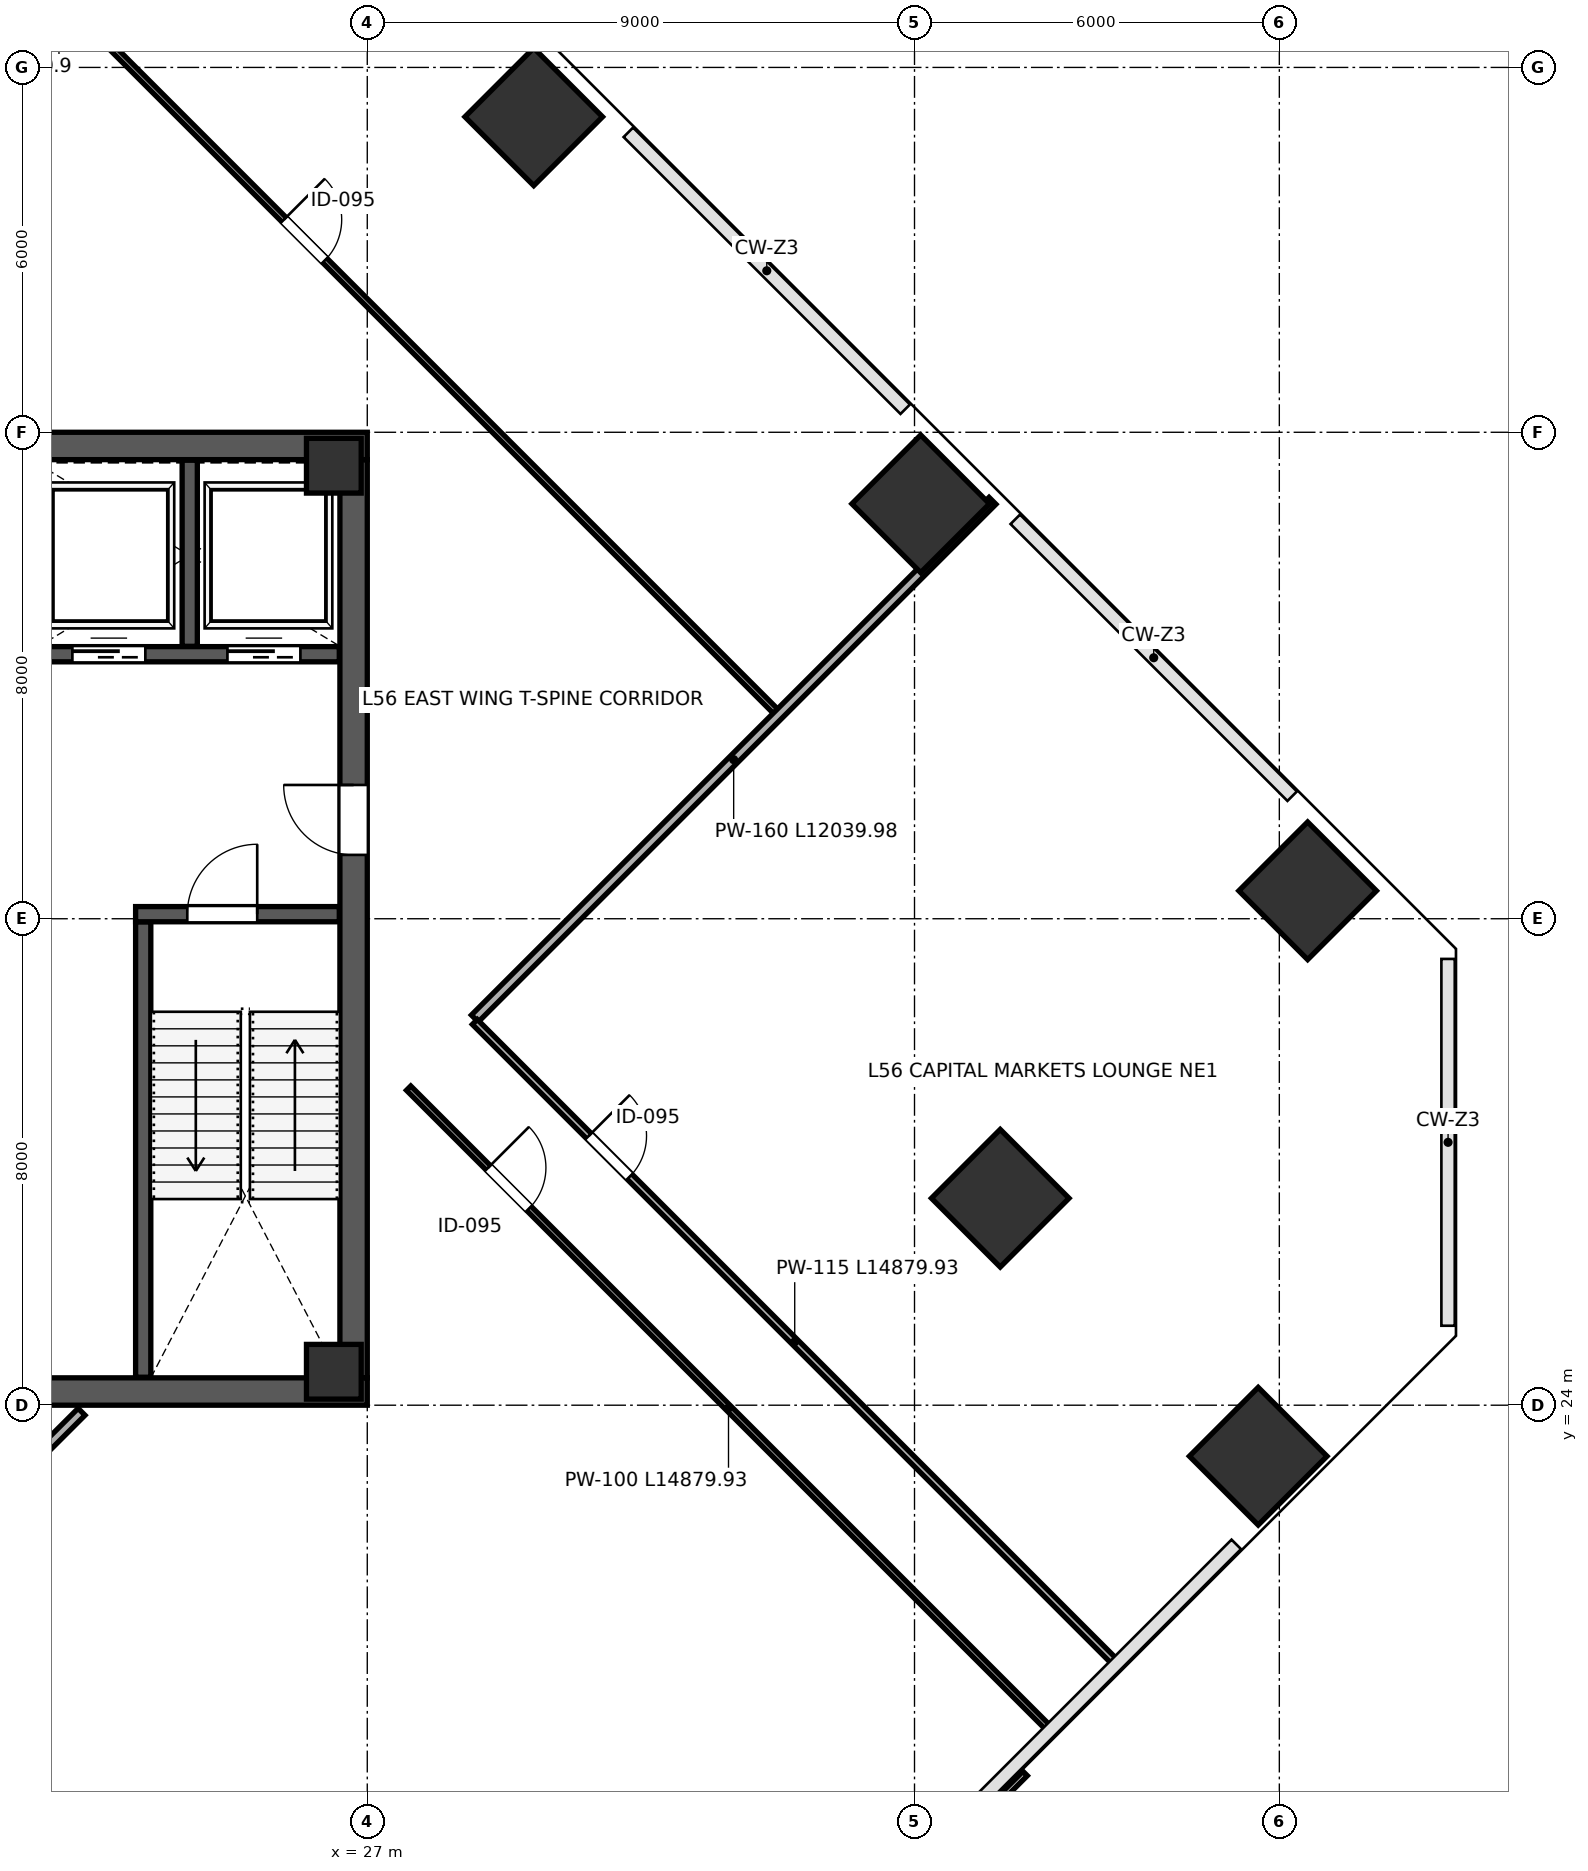
"""IFC4 building model, lengths in metres.
Left out: names, types, materials, properties, quantities, classifications, styles, units other than length and angle.
Written with IfcOpenShell. Run it as: python <this file> out.ifc"""

import sys

from ifc_helpers import new_model, si_unit, direction, frame, frame_2d, origin, origin_2d, place, context, subcontext, project, spatial, rectangle, extrude, source, transform, mapped, element, fill, save


model = new_model("IFC4")
c1 = context("Model", 3, precision=1e-05, world=origin(), true_north=direction((0.0, 1.0)))
c2 = subcontext(c1, "Body", "Model", "MODEL_VIEW")
j1 = project(units=[si_unit("LENGTHUNIT", "METRE"), si_unit("PLANEANGLEUNIT", "RADIAN")], contexts=[c1])
p1 = place(None, origin())
s1 = spatial("IfcSite", under=j1, at=p1, CompositionType="ELEMENT")
p2 = place(p1, origin())
s2 = spatial("IfcBuilding", under=s1, at=p2, CompositionType="ELEMENT")
p3 = place(p2, frame((0.0, 0.0, 250.0)))
s3 = spatial("IfcBuildingStorey", under=s2, at=p3, CompositionType="ELEMENT", Elevation=250.0)
m1 = source(origin(), c2, "Body", "SweptSolid", [
    extrude(rectangle(XDim=0.9, YDim=0.9, at=origin_2d()), origin(), (0.0, 0.0, 1.0), 4.198),
])
for number, where, z_axis, x_axis in (
    (1, (26.45, 24.55, 0.001), (0.0, 0.0, 1.0), (1.0, 0.0, 0.0)),
    (2, (26.45, 39.45, 0.001), (0.0, 0.0, 1.0), (1.0, 0.0, 0.0)),
):
    element("IfcColumn", number, at=place(p3, frame(where, z_axis=z_axis, x_axis=x_axis)), inside=s3, PredefinedType="COLUMN", context=c2, shape_type="MappedRepresentation", body=[
        mapped(m1, transform((0.0, 0.0, 0.0), scale=1.0)),
    ])
m2 = source(origin(), c2, "Body", "SweptSolid", [
    extrude(rectangle(XDim=1.6, YDim=1.6, at=origin_2d()), origin(), (0.0, 0.0, 1.0), 4.198),
])
for number, where, z_axis, x_axis in (
    (3, (29.738, 45.188, 0.001), (0.0, 0.0, 1.0), (-0.707, 0.707, 0.0)),
    (4, (36.102, 38.823, 0.001), (0.0, 0.0, 1.0), (-0.707, 0.707, 0.0)),
):
    element("IfcColumn", number, at=place(p3, frame(where, z_axis=z_axis, x_axis=x_axis)), inside=s3, PredefinedType="COLUMN", context=c2, shape_type="MappedRepresentation", body=[
        mapped(m2, transform((0.0, 0.0, 0.0), scale=1.0)),
    ])
m3 = source(origin(), c2, "Body", "SweptSolid", [
    extrude(rectangle(XDim=1.6, YDim=1.6, at=origin_2d()), origin(), (0.0, 0.0, 1.0), 4.198),
])
p4 = place(p3, frame((37.41, 27.404, 0.001), z_axis=(0.0, 0.0, 1.0), x_axis=(-0.707106781187, 0.707106781187, 0.0)))
e5 = element("IfcColumn", 5, at=p4, inside=s3, PredefinedType="COLUMN", context=c2, shape_type="MappedRepresentation", body=[
    mapped(m3, transform((0.0, 0.0, 0.0), scale=1.0)),
])
for number, where, z_axis, x_axis in (
    (6, (42.466, 32.46, 0.001), (0.0, 0.0, 1.0), (-0.707, 0.707, 0.0)),
    (7, (41.653, 23.161, 0.001), (0.0, 0.0, 1.0), (-0.707, 0.707, 0.0)),
):
    element("IfcColumn", number, at=place(p3, frame(where, z_axis=z_axis, x_axis=x_axis)), inside=s3, PredefinedType="COLUMN", context=c2, shape_type="MappedRepresentation", body=[
        mapped(m2, transform((0.0, 0.0, 0.0), scale=1.0)),
    ])
p5 = place(p3, frame((26.775, 24.45, 0.0), z_axis=(0.0, 0.0, 1.0), x_axis=(0.0, 1.0, 0.0)))
e8 = element("IfcWall", 8, at=p5, inside=s3, PredefinedType="SHEAR", context=c2, shape_type="SweptSolid", body=[
    extrude(rectangle(XDim=15.1, YDim=0.45, at=frame_2d((7.55, 0.0))), origin(), (0.0, 0.0, 1.0), 3.96),
])
p6 = place(p5, frame((8.6, 0.0, 0.0)))
e9 = element("IfcOpeningElement", 9, at=p6, cuts=e8, PredefinedType="OPENING", context=c2, shape_type="SweptSolid", body=[
    extrude(rectangle(XDim=1.15, YDim=2.2, at=frame_2d((0.575, 1.1))), frame((0.0, 0.235, 0.0), z_axis=(0.0, -1.0, 0.0), x_axis=(1.0, 0.0, 0.0)), (0.0, 0.0, 1.0), 0.47),
])
for number, where, z_axis, x_axis in (
    (10, (9.0, 24.225, 0.0), (0.0, 0.0, 1.0), (1.0, 0.0, 0.0)),
    (11, (9.0, 39.775, 0.0), (0.0, 0.0, 1.0), (1.0, 0.0, 0.0)),
):
    element("IfcWall", number, at=place(p3, frame(where, z_axis=z_axis, x_axis=x_axis)), inside=s3, PredefinedType="SHEAR", context=c2, shape_type="SweptSolid", body=[
        extrude(rectangle(XDim=18.0, YDim=0.45, at=frame_2d((9.0, 0.0))), origin(), (0.0, 0.0, 1.0), 3.96),
    ])
p7 = place(p3, frame((23.315, 24.46, 0.0), z_axis=(0.0, 0.0, 1.0), x_axis=(0.0, 1.0, 0.0)))
e12 = element("IfcWall", 12, at=p7, inside=s3, PredefinedType="SHEAR", context=c2, shape_type="SweptSolid", body=[
    extrude(rectangle(XDim=7.49, YDim=0.25, at=frame_2d((3.745, 0.0))), origin(), (0.0, 0.0, 1.0), 3.96),
])
p8 = place(p3, frame((23.19, 32.075, 0.0), z_axis=(0.0, 0.0, 1.0), x_axis=(1.0, 0.0, 0.0)))
e13 = element("IfcWall", 13, at=p8, inside=s3, PredefinedType="SHEAR", context=c2, shape_type="SweptSolid", body=[
    extrude(rectangle(XDim=3.35, YDim=0.25, at=frame_2d((1.675, 0.0))), origin(), (0.0, 0.0, 1.0), 3.96),
])
p9 = place(p8, frame((0.85, 0.0, 0.0)))
e14 = element("IfcOpeningElement", 14, at=p9, cuts=e13, PredefinedType="OPENING", context=c2, shape_type="SweptSolid", body=[
    extrude(rectangle(XDim=1.15, YDim=2.2, at=frame_2d((0.575, 1.1))), frame((0.0, 0.135, 0.0), z_axis=(0.0, -1.0, 0.0), x_axis=(1.0, 0.0, 0.0)), (0.0, 0.0, 1.0), 0.27),
])
p10 = place(p3, frame((21.45, 36.35, 0.0), z_axis=(0.0, 0.0, 1.0), x_axis=(1.0, 0.0, 0.0)))
e15 = element("IfcWall", 15, at=p10, inside=s3, PredefinedType="SHEAR", context=c2, shape_type="SweptSolid", body=[
    extrude(rectangle(XDim=5.09, YDim=0.25, at=frame_2d((2.545, 0.0))), origin(), (0.0, 0.0, 1.0), 3.96),
])
p11 = place(p10, frame((0.7, 0.0, 0.0)))
e16 = element("IfcOpeningElement", 16, at=p11, cuts=e15, PredefinedType="OPENING", context=c2, shape_type="SweptSolid", body=[
    extrude(rectangle(XDim=1.2, YDim=2.2, at=frame_2d((0.6, 1.1))), frame((0.0, 0.135, 0.0), z_axis=(0.0, -1.0, 0.0), x_axis=(1.0, 0.0, 0.0)), (0.0, 0.0, 1.0), 0.27),
])
p12 = place(p10, frame((3.25, 0.0, 0.0)))
e17 = element("IfcOpeningElement", 17, at=p12, cuts=e15, PredefinedType="OPENING", context=c2, shape_type="SweptSolid", body=[
    extrude(rectangle(XDim=1.2, YDim=2.2, at=frame_2d((0.6, 1.1))), frame((0.0, 0.135, 0.0), z_axis=(0.0, -1.0, 0.0), x_axis=(1.0, 0.0, 0.0)), (0.0, 0.0, 1.0), 0.27),
])
p13 = place(p3, frame((24.08, 36.48, 0.0), z_axis=(0.0, 0.0, 1.0), x_axis=(0.0, 1.0, 0.0)))
e18 = element("IfcWall", 18, at=p13, inside=s3, PredefinedType="SHEAR", context=c2, shape_type="SweptSolid", body=[
    extrude(rectangle(XDim=3.06, YDim=0.25, at=frame_2d((1.53, 0.0))), origin(), (0.0, 0.0, 1.0), 3.96),
])
p14 = place(p3, frame((17.993, 51.134, 0.0), z_axis=(0.0, 0.0, 1.0), x_axis=(0.707106781187, -0.707106781187, 0.0)))
e19 = element("IfcWall", 19, at=p14, inside=s3, PredefinedType="PARTITIONING", context=c2, shape_type="SweptSolid", body=[
    extrude(rectangle(XDim=22.27, YDim=0.1, at=frame_2d((11.135, 0.0))), origin(), (0.0, 0.0, 1.0), 3.96),
])
p15 = place(p14, frame((10.8, 0.0, 0.0)))
e20 = element("IfcOpeningElement", 20, at=p15, cuts=e19, PredefinedType="OPENING", context=c2, shape_type="SweptSolid", body=[
    extrude(rectangle(XDim=0.95, YDim=2.15, at=frame_2d((0.475, 1.075))), frame((0.0, 0.06, 0.0), z_axis=(0.0, -1.0, 0.0), x_axis=(1.0, 0.0, 0.0)), (0.0, 0.0, 1.0), 0.12),
])
p16 = place(p3, frame((28.769, 30.36, 0.0), z_axis=(0.0, 0.0, 1.0), x_axis=(0.707116919863, 0.707096642365, 0.0)))
e21 = element("IfcWall", 21, at=p16, inside=s3, PredefinedType="PARTITIONING", context=c2, shape_type="SweptSolid", body=[
    extrude(rectangle(XDim=12.04, YDim=0.16, at=frame_2d((6.02, 0.0))), origin(), (0.0, 0.0, 1.0), 3.195),
])
p17 = place(p3, frame((13.213, 14.803, 0.0), z_axis=(0.0, 0.0, 1.0), x_axis=(0.707116278481, 0.707097283765, 0.0)))
e22 = element("IfcWall", 22, at=p17, inside=s3, PredefinedType="PARTITIONING", context=c2, shape_type="SweptSolid", body=[
    extrude(rectangle(XDim=12.853, YDim=0.16, at=frame_2d((6.427, 0.0))), origin(), (0.0, 0.0, 1.0), 3.96),
])
p18 = place(p3, frame((28.769, 30.303, 0.0), z_axis=(0.0, 0.0, 1.0), x_axis=(0.707106781187, -0.707106781187, 0.0)))
e23 = element("IfcWall", 23, at=p18, inside=s3, PredefinedType="PARTITIONING", context=c2, shape_type="SweptSolid", body=[
    extrude(rectangle(XDim=14.88, YDim=0.115, at=frame_2d((7.44, 0.0))), origin(), (0.0, 0.0, 1.0), 3.96),
])
p19 = place(p18, frame((2.65, 0.0, 0.0)))
e24 = element("IfcOpeningElement", 24, at=p19, cuts=e23, PredefinedType="OPENING", context=c2, shape_type="SweptSolid", body=[
    extrude(rectangle(XDim=0.95, YDim=2.15, at=frame_2d((0.475, 1.075))), frame((0.0, 0.067, 0.0), z_axis=(0.0, -1.0, 0.0), x_axis=(1.0, 0.0, 0.0)), (0.0, 0.0, 1.0), 0.135),
])
p20 = place(p3, frame((27.68, 29.214, 0.0), z_axis=(0.0, 0.0, 1.0), x_axis=(0.707106781187, -0.707106781187, 0.0)))
e25 = element("IfcWall", 25, at=p20, inside=s3, PredefinedType="PARTITIONING", context=c2, shape_type="SweptSolid", body=[
    extrude(rectangle(XDim=14.88, YDim=0.1, at=frame_2d((7.44, 0.0))), origin(), (0.0, 0.0, 1.0), 3.96),
])
p21 = place(p20, frame((1.85, 0.0, 0.0)))
e26 = element("IfcOpeningElement", 26, at=p21, cuts=e25, PredefinedType="OPENING", context=c2, shape_type="SweptSolid", body=[
    extrude(rectangle(XDim=0.95, YDim=2.15, at=frame_2d((0.475, 1.075))), frame((0.0, 0.06, 0.0), z_axis=(0.0, -1.0, 0.0), x_axis=(1.0, 0.0, 0.0)), (0.0, 0.0, 1.0), 0.12),
])
m4 = source(origin(), c2, "Body", "SweptSolid", [
    extrude(rectangle(XDim=1.15, YDim=2.2, at=frame_2d((0.575, 1.1))), frame((0.0, 0.025, 0.0), z_axis=(0.0, -1.0, 0.0), x_axis=(1.0, 0.0, 0.0)), (0.0, 0.0, 1.0), 0.05),
])
p22 = place(p9, origin())
e27 = element("IfcDoor", 27, at=p22, inside=s3, OperationType="SINGLE_SWING_RIGHT", PredefinedType="DOOR", context=c2, shape_type="MappedRepresentation", body=[
    mapped(m4, transform((0.0, 0.0, 0.0), scale=1.0)),
])
fill(e14, e27)
m5 = source(origin(), c2, "Body", "SweptSolid", [
    extrude(rectangle(XDim=1.15, YDim=2.2, at=frame_2d((0.575, 1.1))), frame((0.0, 0.025, 0.0), z_axis=(0.0, -1.0, 0.0), x_axis=(1.0, 0.0, 0.0)), (0.0, 0.0, 1.0), 0.05),
])
p23 = place(p6, origin())
e28 = element("IfcDoor", 28, at=p23, inside=s3, OperationType="SINGLE_SWING_RIGHT", PredefinedType="DOOR", context=c2, shape_type="MappedRepresentation", body=[
    mapped(m5, transform((0.0, 0.0, 0.0), scale=1.0)),
])
fill(e9, e28)
m6 = source(origin(), c2, "Body", "SweptSolid", [
    extrude(rectangle(XDim=1.2, YDim=2.2, at=frame_2d((0.6, 1.1))), frame((0.0, 0.025, 0.0), z_axis=(0.0, -1.0, 0.0), x_axis=(1.0, 0.0, 0.0)), (0.0, 0.0, 1.0), 0.05),
])
p24 = place(p11, origin())
e29 = element("IfcDoor", 29, at=p24, inside=s3, OperationType="SLIDING_TO_LEFT", PredefinedType="DOOR", context=c2, shape_type="MappedRepresentation", body=[
    mapped(m6, transform((0.0, 0.0, 0.0), scale=1.0)),
])
fill(e16, e29)
p25 = place(p12, origin())
e30 = element("IfcDoor", 30, at=p25, inside=s3, OperationType="SLIDING_TO_RIGHT", PredefinedType="DOOR", context=c2, shape_type="MappedRepresentation", body=[
    mapped(m6, transform((0.0, 0.0, 0.0), scale=1.0)),
])
fill(e17, e30)
m7 = source(origin(), c2, "Body", "SweptSolid", [
    extrude(rectangle(XDim=0.95, YDim=2.15, at=frame_2d((0.475, 1.075))), frame((0.0, 0.025, 0.0), z_axis=(0.0, -1.0, 0.0), x_axis=(1.0, 0.0, 0.0)), (0.0, 0.0, 1.0), 0.05),
])
p26 = place(p15, origin())
e31 = element("IfcDoor", 31, at=p26, inside=s3, OperationType="SINGLE_SWING_LEFT", PredefinedType="DOOR", context=c2, shape_type="MappedRepresentation", body=[
    mapped(m7, transform((0.0, 0.0, 0.0), scale=1.0)),
])
fill(e20, e31)
p27 = place(p19, origin())
e32 = element("IfcDoor", 32, at=p27, inside=s3, OperationType="SINGLE_SWING_LEFT", PredefinedType="DOOR", context=c2, shape_type="MappedRepresentation", body=[
    mapped(m7, transform((0.0, 0.0, 0.0), scale=1.0)),
])
fill(e24, e32)
p28 = place(p21, origin())
e33 = element("IfcDoor", 33, at=p28, inside=s3, OperationType="SINGLE_SWING_LEFT", PredefinedType="DOOR", context=c2, shape_type="MappedRepresentation", body=[
    mapped(m7, transform((0.0, 0.0, 0.0), scale=1.0)),
])
fill(e26, e33)
save(model, sys.argv[1])
